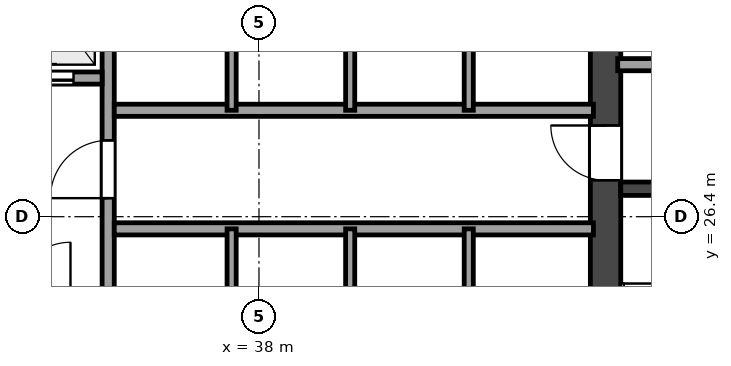
"""IFC4 building model, lengths in metres.
Left out: names, types, materials, properties, quantities, classifications, styles, units other than length and angle.
Written with IfcOpenShell. Run it as: python <this file> out.ifc"""

import sys

from ifc_helpers import new_model, si_unit, direction, frame, frame_2d, origin, place, context, subcontext, project, spatial, rectangle, extrude, element, fill, save


model = new_model("IFC4")
c1 = context("Model", 3, precision=1e-05, world=origin(), true_north=direction((0.0, 1.0)))
c2 = subcontext(c1, "Body", "Model", "MODEL_VIEW")
j1 = project(units=[si_unit("LENGTHUNIT", "METRE"), si_unit("PLANEANGLEUNIT", "RADIAN")], contexts=[c1])
p1 = place(None, origin())
s1 = spatial("IfcSite", under=j1, at=p1, CompositionType="ELEMENT")
p2 = place(p1, origin())
s2 = spatial("IfcBuilding", under=s1, at=p2, CompositionType="ELEMENT")
p3 = place(p2, frame((0.0, 0.0, 16.2)))
s3 = spatial("IfcBuildingStorey", under=s2, at=p3, CompositionType="ELEMENT", Elevation=16.2)
p4 = place(p3, frame((43.7, 18.925, 0.0), z_axis=(0.0, 0.0, 1.0), x_axis=(0.0, 1.0, 0.0)))
e1 = element("IfcWall", 1, at=p4, inside=s3, PredefinedType="SHEAR", context=c2, shape_type="SweptSolid", body=[
    extrude(rectangle(XDim=14.95, YDim=0.5, at=frame_2d((7.475, 0.0))), origin(), (0.0, 0.0, 1.0), 4.98),
])
p5 = place(p4, frame((8.075, 0.0, 0.0)))
e2 = element("IfcOpeningElement", 2, at=p5, cuts=e1, PredefinedType="OPENING", context=c2, shape_type="SweptSolid", body=[
    extrude(rectangle(XDim=0.9, YDim=2.1, at=frame_2d((0.45, 1.05))), frame((0.0, 0.26, 0.0), z_axis=(0.0, -1.0, 0.0), x_axis=(1.0, 0.0, 0.0)), (0.0, 0.0, 1.0), 0.52),
])
p6 = place(p3, frame((43.95, 26.86, 0.0), z_axis=(0.0, 0.0, 1.0), x_axis=(1.0, 0.0, 0.0)))
e3 = element("IfcWall", 3, at=p6, inside=s3, PredefinedType="SHEAR", context=c2, shape_type="SweptSolid", body=[
    extrude(rectangle(XDim=3.325, YDim=0.22, at=frame_2d((1.663, 0.0))), origin(), (0.0, 0.0, 1.0), 4.98),
])
p7 = place(p3, frame((43.9, 28.9, 0.0), z_axis=(0.0, 0.0, 1.0), x_axis=(1.0, 0.0, 0.0)))
e4 = element("IfcWall", 4, at=p7, inside=s3, PredefinedType="SOLIDWALL", context=c2, shape_type="SweptSolid", body=[
    extrude(rectangle(XDim=3.35, YDim=0.2, at=frame_2d((1.675, 0.0))), origin(), (0.0, 0.0, 1.0), 4.98),
])
p8 = place(p7, frame((1.15, 0.0, 0.0)))
e5 = element("IfcOpeningElement", 5, at=p8, cuts=e4, PredefinedType="OPENING", context=c2, shape_type="SweptSolid", body=[
    extrude(rectangle(XDim=0.9, YDim=2.1, at=frame_2d((0.45, 1.05))), frame((0.0, 0.11, 0.0), z_axis=(0.0, -1.0, 0.0), x_axis=(1.0, 0.0, 0.0)), (0.0, 0.0, 1.0), 0.22),
])
p9 = place(p3, frame((35.52, 18.95, 0.0), z_axis=(0.0, 0.0, 1.0), x_axis=(0.0, 1.0, 0.0)))
e6 = element("IfcWall", 6, at=p9, inside=s3, PredefinedType="SOLIDWALL", context=c2, shape_type="SweptSolid", body=[
    extrude(rectangle(XDim=14.9, YDim=0.2, at=frame_2d((7.45, 0.0))), origin(), (0.0, 0.0, 1.0), 4.501),
])
p10 = place(p9, frame((7.755, 0.0, 0.0)))
e7 = element("IfcOpeningElement", 7, at=p10, cuts=e6, PredefinedType="OPENING", context=c2, shape_type="SweptSolid", body=[
    extrude(rectangle(XDim=0.95, YDim=2.15, at=frame_2d((0.475, 1.075))), frame((0.0, 0.11, 0.0), z_axis=(0.0, -1.0, 0.0), x_axis=(1.0, 0.0, 0.0)), (0.0, 0.0, 1.0), 0.22),
])
p11 = place(p9, frame((0.6, 0.0, 0.0)))
e8 = element("IfcOpeningElement", 8, at=p11, cuts=e6, PredefinedType="OPENING", context=c2, shape_type="SweptSolid", body=[
    extrude(rectangle(XDim=0.9, YDim=2.1, at=frame_2d((0.45, 1.05))), frame((0.0, 0.11, 0.0), z_axis=(0.0, -1.0, 0.0), x_axis=(1.0, 0.0, 0.0)), (0.0, 0.0, 1.0), 0.22),
])
p12 = place(p3, frame((31.0, 28.68, 0.0), z_axis=(0.0, 0.0, 1.0), x_axis=(1.0, 0.0, 0.0)))
e9 = element("IfcWall", 9, at=p12, inside=s3, PredefinedType="SOLIDWALL", context=c2, shape_type="SweptSolid", body=[
    extrude(rectangle(XDim=4.42, YDim=0.2, at=frame_2d((2.21, 0.0))), origin(), (0.0, 0.0, 1.0), 4.98),
])
p13 = place(p12, frame((0.6, 0.0, 0.0)))
e10 = element("IfcOpeningElement", 10, at=p13, cuts=e9, PredefinedType="OPENING", context=c2, shape_type="SweptSolid", body=[
    extrude(rectangle(XDim=1.1, YDim=2.15, at=frame_2d((0.55, 1.075))), frame((0.0, 0.11, 0.0), z_axis=(0.0, -1.0, 0.0), x_axis=(1.0, 0.0, 0.0)), (0.0, 0.0, 1.0), 0.22),
])
p14 = place(p12, frame((2.85, 0.0, 0.0)))
e11 = element("IfcOpeningElement", 11, at=p14, cuts=e9, PredefinedType="OPENING", context=c2, shape_type="SweptSolid", body=[
    extrude(rectangle(XDim=1.1, YDim=2.15, at=frame_2d((0.55, 1.075))), frame((0.0, 0.11, 0.0), z_axis=(0.0, -1.0, 0.0), x_axis=(1.0, 0.0, 0.0)), (0.0, 0.0, 1.0), 0.22),
])
for number, where, z_axis, x_axis in (
    (12, (35.62, 28.15, 0.0), (0.0, 0.0, 1.0), (1.0, 0.0, 0.0)),
    (13, (35.62, 26.2, 0.0), (0.0, 0.0, 1.0), (1.0, 0.0, 0.0)),
):
    element("IfcWall", number, at=place(p3, frame(where, z_axis=z_axis, x_axis=x_axis)), inside=s3, PredefinedType="SOLIDWALL", context=c2, shape_type="SweptSolid", body=[
        extrude(rectangle(XDim=7.88, YDim=0.2, at=frame_2d((3.94, 0.0))), origin(), (0.0, 0.0, 1.0), 4.98),
    ])
for number, where, z_axis, x_axis in (
    (14, (37.55, 28.15, 0.0), (0.0, 0.0, 1.0), (0.0, 1.0, 0.0)),
    (15, (39.5, 28.15, 0.0), (0.0, 0.0, 1.0), (0.0, 1.0, 0.0)),
    (16, (41.45, 28.15, 0.0), (0.0, 0.0, 1.0), (0.0, 1.0, 0.0)),
):
    element("IfcWall", number, at=place(p3, frame(where, z_axis=z_axis, x_axis=x_axis)), inside=s3, PredefinedType="PARTITIONING", context=c2, shape_type="SweptSolid", body=[
        extrude(rectangle(XDim=2.43, YDim=0.15, at=frame_2d((1.215, 0.0))), origin(), (0.0, 0.0, 1.0), 4.98),
    ])
for number, where, z_axis, x_axis in (
    (17, (37.55, 23.65, 0.0), (0.0, 0.0, 1.0), (0.0, 1.0, 0.0)),
    (18, (39.5, 23.65, 0.0), (0.0, 0.0, 1.0), (0.0, 1.0, 0.0)),
    (19, (41.45, 23.65, 0.0), (0.0, 0.0, 1.0), (0.0, 1.0, 0.0)),
):
    element("IfcWall", number, at=place(p3, frame(where, z_axis=z_axis, x_axis=x_axis)), inside=s3, PredefinedType="PARTITIONING", context=c2, shape_type="SweptSolid", body=[
        extrude(rectangle(XDim=2.55, YDim=0.15, at=frame_2d((1.275, 0.0))), origin(), (0.0, 0.0, 1.0), 4.501),
    ])
p15 = place(p10, origin())
e20 = element("IfcDoor", 20, at=p15, inside=s3, OperationType="SINGLE_SWING_LEFT", PredefinedType="DOOR", context=c2, shape_type="SweptSolid", body=[
    extrude(rectangle(XDim=0.95, YDim=2.15, at=frame_2d((0.475, 1.075))), frame((0.0, 0.025, 0.0), z_axis=(0.0, -1.0, 0.0), x_axis=(1.0, 0.0, 0.0)), (0.0, 0.0, 1.0), 0.05),
])
fill(e7, e20)
p16 = place(p5, origin())
e21 = element("IfcDoor", 21, at=p16, inside=s3, OperationType="SINGLE_SWING_RIGHT", PredefinedType="DOOR", context=c2, shape_type="SweptSolid", body=[
    extrude(rectangle(XDim=0.9, YDim=2.1, at=frame_2d((0.45, 1.05))), frame((0.0, 0.025, 0.0), z_axis=(0.0, -1.0, 0.0), x_axis=(1.0, 0.0, 0.0)), (0.0, 0.0, 1.0), 0.05),
])
fill(e2, e21)
p17 = place(p14, origin())
e22 = element("IfcDoor", 22, at=p17, inside=s3, OperationType="SLIDING_TO_LEFT", PredefinedType="DOOR", context=c2, shape_type="SweptSolid", body=[
    extrude(rectangle(XDim=1.1, YDim=2.15, at=frame_2d((0.55, 1.075))), frame((0.0, 0.025, 0.0), z_axis=(0.0, -1.0, 0.0), x_axis=(1.0, 0.0, 0.0)), (0.0, 0.0, 1.0), 0.05),
])
fill(e11, e22)
save(model, sys.argv[1])
